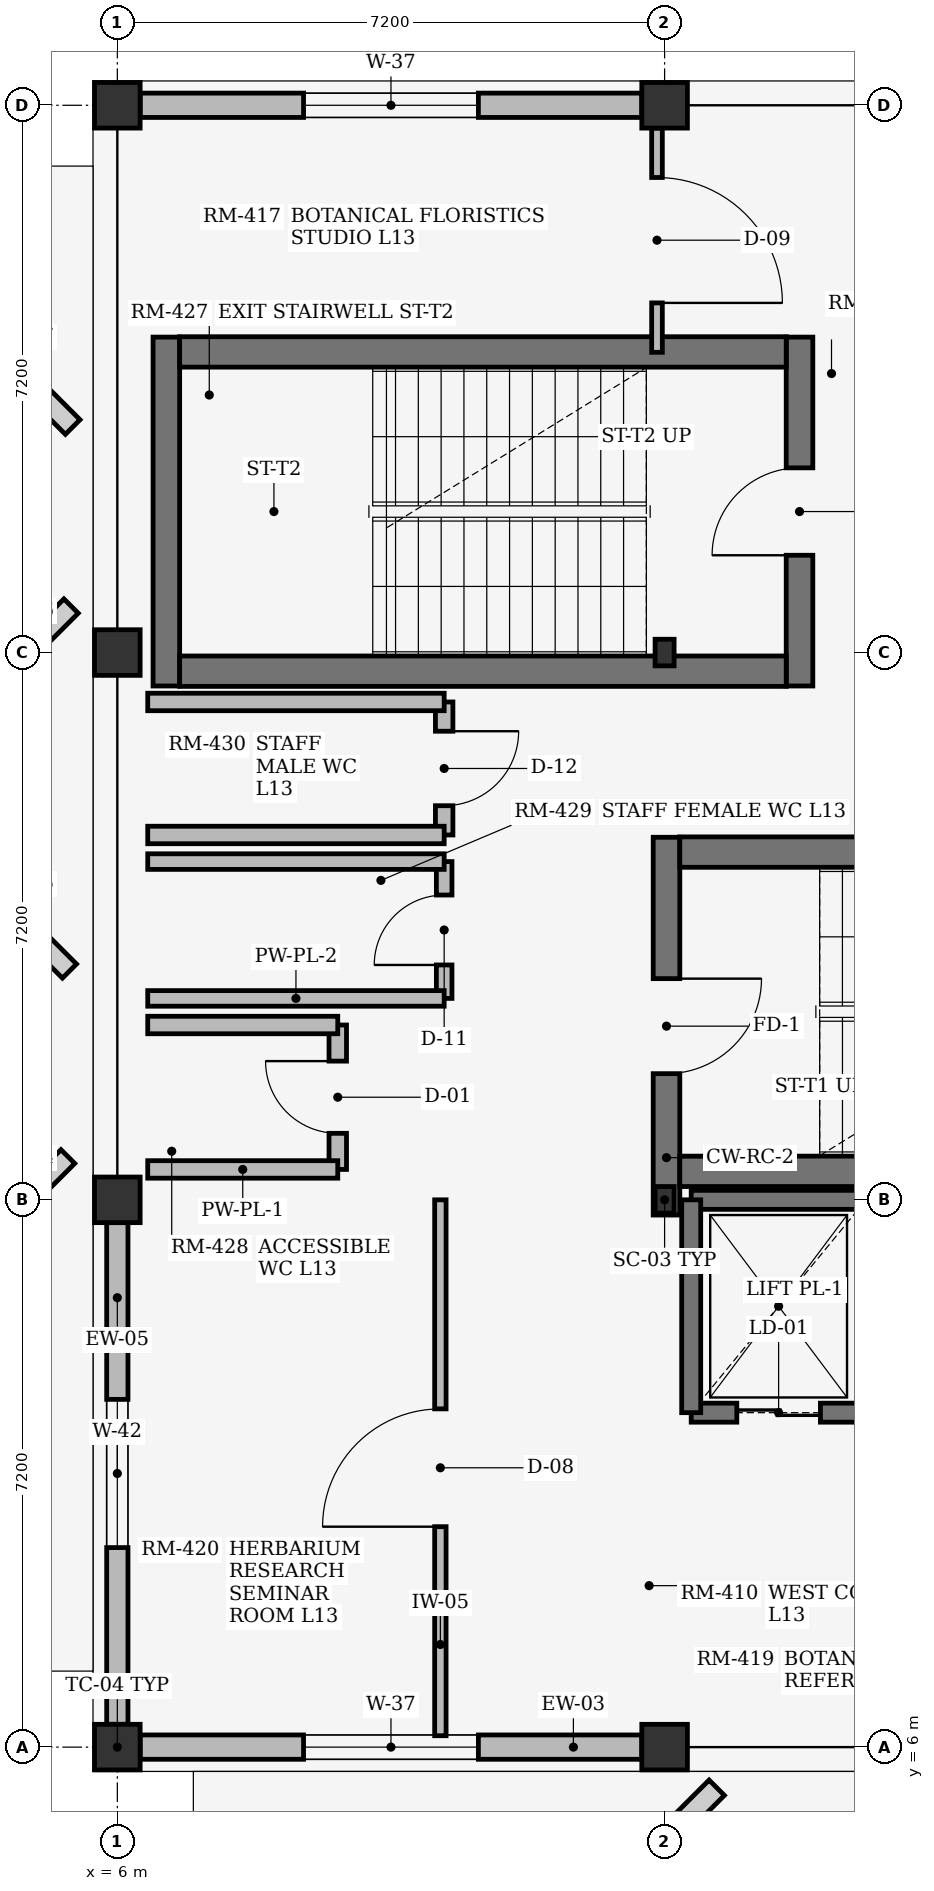
"""IFC4 building model, lengths in metres.
Left out: names, types, materials, properties, quantities, classifications, styles, units other than length and angle.
Written with IfcOpenShell. Run it as: python <this file> out.ifc"""

import sys

from ifc_helpers import new_model, si_unit, direction, frame, frame_2d, origin, origin_2d, place, context, subcontext, project, spatial, rectangle, i_section, extrude, element, fill, save


model = new_model("IFC4")
c1 = context("Model", 3, precision=1e-05, world=origin(), true_north=direction((0.0, 1.0)))
c2 = subcontext(c1, "Body", "Model", "MODEL_VIEW")
j1 = project(units=[si_unit("LENGTHUNIT", "METRE"), si_unit("PLANEANGLEUNIT", "RADIAN")], contexts=[c1])
p1 = place(None, origin())
s1 = spatial("IfcSite", under=j1, at=p1, CompositionType="ELEMENT")
p2 = place(p1, origin())
s2 = spatial("IfcBuilding", under=s1, at=p2, CompositionType="ELEMENT")
p3 = place(p2, frame((0.0, 0.0, 52.2)))
s3 = spatial("IfcBuildingStorey", under=s2, at=p3, CompositionType="ELEMENT", Elevation=52.2)
for number, where, z_axis, x_axis in (
    (1, (6.0, 6.0, 0.0), (0.0, 0.0, 1.0), (1.0, 0.0, 0.0)),
    (2, (6.0, 13.2, 0.0), (0.0, 0.0, 1.0), (1.0, 0.0, 0.0)),
    (3, (6.0, 20.4, 0.0), (0.0, 0.0, 1.0), (1.0, 0.0, 0.0)),
    (4, (6.0, 27.6, 0.0), (0.0, 0.0, 1.0), (1.0, 0.0, 0.0)),
    (5, (13.2, 6.0, 0.0), (0.0, 0.0, 1.0), (1.0, 0.0, 0.0)),
):
    element("IfcColumn", number, at=place(p3, frame(where, z_axis=z_axis, x_axis=x_axis)), inside=s3, PredefinedType="COLUMN", context=c2, shape_type="SweptSolid", body=[
        extrude(rectangle(XDim=0.6, YDim=0.6, at=origin_2d()), origin(), (0.0, 0.0, 1.0), 3.705),
    ])
for number, where, z_axis, x_axis in (
    (6, (13.2, 13.2, 0.0), (0.0, 0.0, 1.0), (1.0, 0.0, 0.0)),
    (7, (13.2, 20.4, 0.0), (0.0, 0.0, 1.0), (1.0, 0.0, 0.0)),
):
    element("IfcColumn", number, at=place(p3, frame(where, z_axis=z_axis, x_axis=x_axis)), inside=s3, PredefinedType="COLUMN", context=c2, shape_type="SweptSolid", body=[
        extrude(i_section(OverallWidth=0.25, OverallDepth=0.35, WebThickness=0.01, FlangeThickness=0.012, at=origin_2d()), origin(), (0.0, 0.0, 1.0), 3.705),
    ])
p4 = place(p3, frame((13.2, 27.6, 0.0), z_axis=(0.0, 0.0, 1.0), x_axis=(1.0, 0.0, 0.0)))
e8 = element("IfcColumn", 8, at=p4, inside=s3, PredefinedType="COLUMN", context=c2, shape_type="SweptSolid", body=[
    extrude(rectangle(XDim=0.6, YDim=0.6, at=origin_2d()), origin(), (0.0, 0.0, 1.0), 3.705),
])
p5 = place(p3, frame((6.3, 6.0, 0.0), z_axis=(0.0, 0.0, 1.0), x_axis=(1.0, 0.0, 0.0)))
e9 = element("IfcWall", 9, at=p5, inside=s3, PredefinedType="STANDARD", context=c2, shape_type="SweptSolid", body=[
    extrude(rectangle(XDim=6.6, YDim=0.32, at=frame_2d((3.3, 0.0))), origin(), (0.0, 0.0, 1.0), 3.285),
])
p6 = place(p5, frame((2.15, 0.0, 0.75)))
e10 = element("IfcOpeningElement", 10, at=p6, cuts=e9, PredefinedType="OPENING", context=c2, shape_type="SweptSolid", body=[
    extrude(rectangle(XDim=2.3, YDim=1.35, at=frame_2d((1.15, 0.675))), frame((0.0, 0.17, 0.0), z_axis=(0.0, -1.0, 0.0), x_axis=(1.0, 0.0, 0.0)), (0.0, 0.0, 1.0), 0.34),
])
p7 = place(p3, frame((6.3, 27.6, 0.0), z_axis=(0.0, 0.0, 1.0), x_axis=(1.0, 0.0, 0.0)))
e11 = element("IfcWall", 11, at=p7, inside=s3, PredefinedType="STANDARD", context=c2, shape_type="SweptSolid", body=[
    extrude(rectangle(XDim=6.6, YDim=0.32, at=frame_2d((3.3, 0.0))), origin(), (0.0, 0.0, 1.0), 3.285),
])
p8 = place(p7, frame((2.15, 0.0, 0.75)))
e12 = element("IfcOpeningElement", 12, at=p8, cuts=e11, PredefinedType="OPENING", context=c2, shape_type="SweptSolid", body=[
    extrude(rectangle(XDim=2.3, YDim=1.35, at=frame_2d((1.15, 0.675))), frame((0.0, 0.17, 0.0), z_axis=(0.0, -1.0, 0.0), x_axis=(1.0, 0.0, 0.0)), (0.0, 0.0, 1.0), 0.34),
])
p9 = place(p3, frame((6.0, 6.3, 0.0), z_axis=(0.0, 0.0, 1.0), x_axis=(0.0, 1.0, 0.0)))
e13 = element("IfcWall", 13, at=p9, inside=s3, PredefinedType="STANDARD", context=c2, shape_type="SweptSolid", body=[
    extrude(rectangle(XDim=6.6, YDim=0.28, at=frame_2d((3.3, 0.0))), origin(), (0.0, 0.0, 1.0), 3.285),
])
p10 = place(p9, frame((2.325, 0.0, 0.75)))
e14 = element("IfcOpeningElement", 14, at=p10, cuts=e13, PredefinedType="OPENING", context=c2, shape_type="SweptSolid", body=[
    extrude(rectangle(XDim=1.95, YDim=1.5, at=frame_2d((0.975, 0.75))), frame((0.0, 0.15, 0.0), z_axis=(0.0, -1.0, 0.0), x_axis=(1.0, 0.0, 0.0)), (0.0, 0.0, 1.0), 0.3),
])
p11 = place(p3, frame((13.225, 13.0, 0.0), z_axis=(0.0, 0.0, 1.0), x_axis=(0.0, 1.0, 0.0)))
e15 = element("IfcWall", 15, at=p11, inside=s3, PredefinedType="SHEAR", context=c2, shape_type="SweptSolid", body=[
    extrude(rectangle(XDim=4.97, YDim=0.35, at=frame_2d((2.485, 0.0))), origin(), (0.0, 0.0, 1.0), 3.705),
])
p12 = place(p11, frame((1.86, 0.0, 0.0)))
e16 = element("IfcOpeningElement", 16, at=p12, cuts=e15, PredefinedType="OPENING", context=c2, shape_type="SweptSolid", body=[
    extrude(rectangle(XDim=1.25, YDim=2.2, at=frame_2d((0.625, 1.1))), frame((0.0, 0.185, 0.0), z_axis=(0.0, -1.0, 0.0), x_axis=(1.0, 0.0, 0.0)), (0.0, 0.0, 1.0), 0.37),
])
for number, where, z_axis, x_axis in (
    (17, (13.4, 13.575, 0.0), (0.0, 0.0, 1.0), (1.0, 0.0, 0.0)),
    (18, (13.4, 17.775, 0.0), (0.0, 0.0, 1.0), (1.0, 0.0, 0.0)),
):
    element("IfcWall", number, at=place(p3, frame(where, z_axis=z_axis, x_axis=x_axis)), inside=s3, PredefinedType="SHEAR", context=c2, shape_type="SweptSolid", body=[
        extrude(rectangle(XDim=7.98, YDim=0.4, at=frame_2d((3.99, 0.0))), origin(), (0.0, 0.0, 1.0), 3.705),
    ])
p13 = place(p3, frame((14.975, 24.55, 0.0), z_axis=(0.0, 0.0, 1.0), x_axis=(0.0, -1.0, 0.0)))
e19 = element("IfcWall", 19, at=p13, inside=s3, PredefinedType="SHEAR", context=c2, shape_type="SweptSolid", body=[
    extrude(rectangle(XDim=4.59, YDim=0.35, at=frame_2d((2.295, 0.0))), origin(), (0.0, 0.0, 1.0), 3.705),
])
p14 = place(p13, frame((1.72, 0.0, 0.0)))
e20 = element("IfcOpeningElement", 20, at=p14, cuts=e19, PredefinedType="OPENING", context=c2, shape_type="SweptSolid", body=[
    extrude(rectangle(XDim=1.15, YDim=2.2, at=frame_2d((0.575, 1.1))), frame((0.0, 0.185, 0.0), z_axis=(0.0, -1.0, 0.0), x_axis=(1.0, 0.0, 0.0)), (0.0, 0.0, 1.0), 0.37),
])
p15 = place(p3, frame((6.645, 24.55, 0.0), z_axis=(0.0, 0.0, 1.0), x_axis=(0.0, -1.0, 0.0)))
e21 = element("IfcWall", 21, at=p15, inside=s3, PredefinedType="SHEAR", context=c2, shape_type="SweptSolid", body=[
    extrude(rectangle(XDim=4.59, YDim=0.35, at=frame_2d((2.295, 0.0))), origin(), (0.0, 0.0, 1.0), 3.705),
])
for number, where, z_axis, x_axis in (
    (22, (14.8, 24.355, 0.0), (0.0, 0.0, 1.0), (-1.0, 0.0, 0.0)),
    (23, (14.8, 20.155, 0.0), (0.0, 0.0, 1.0), (-1.0, 0.0, 0.0)),
):
    element("IfcWall", number, at=place(p3, frame(where, z_axis=z_axis, x_axis=x_axis)), inside=s3, PredefinedType="SHEAR", context=c2, shape_type="SweptSolid", body=[
        extrude(rectangle(XDim=7.98, YDim=0.4, at=frame_2d((3.99, 0.0))), origin(), (0.0, 0.0, 1.0), 3.705),
    ])
p16 = place(p3, frame((13.55, 10.4, 0.0), z_axis=(0.0, 0.0, 1.0), x_axis=(1.0, 0.0, 0.0)))
e24 = element("IfcWall", 24, at=p16, inside=s3, PredefinedType="SHEAR", context=c2, shape_type="SweptSolid", body=[
    extrude(rectangle(XDim=2.3, YDim=0.25, at=frame_2d((1.15, 0.0))), origin(), (0.0, 0.0, 1.0), 3.705),
])
p17 = place(p16, frame((0.6, 0.0, 0.0)))
e25 = element("IfcOpeningElement", 25, at=p17, cuts=e24, PredefinedType="OPENING", context=c2, shape_type="SweptSolid", body=[
    extrude(rectangle(XDim=1.1, YDim=2.2, at=frame_2d((0.55, 1.1))), frame((0.0, 0.135, 0.0), z_axis=(0.0, -1.0, 0.0), x_axis=(1.0, 0.0, 0.0)), (0.0, 0.0, 1.0), 0.27),
])
p18 = place(p3, frame((13.55, 13.2, 0.0), z_axis=(0.0, 0.0, 1.0), x_axis=(1.0, 0.0, 0.0)))
e26 = element("IfcWall", 26, at=p18, inside=s3, PredefinedType="SHEAR", context=c2, shape_type="SweptSolid", body=[
    extrude(rectangle(XDim=2.3, YDim=0.25, at=frame_2d((1.15, 0.0))), origin(), (0.0, 0.0, 1.0), 3.705),
])
p19 = place(p3, frame((13.55, 10.4, 0.0), z_axis=(0.0, 0.0, 1.0), x_axis=(0.0, 1.0, 0.0)))
e27 = element("IfcWall", 27, at=p19, inside=s3, PredefinedType="SHEAR", context=c2, shape_type="SweptSolid", body=[
    extrude(rectangle(XDim=2.8, YDim=0.25, at=frame_2d((1.4, 0.0))), origin(), (0.0, 0.0, 1.0), 3.705),
])
p20 = place(p3, frame((8.9, 13.6, 0.0), z_axis=(0.0, 0.0, 1.0), x_axis=(0.0, 1.0, 0.0)))
e28 = element("IfcWall", 28, at=p20, inside=s3, PredefinedType="PLUMBINGWALL", context=c2, shape_type="SweptSolid", body=[
    extrude(rectangle(XDim=1.9, YDim=0.23, at=frame_2d((0.95, 0.0))), origin(), (0.0, 0.0, 1.0), 3.685),
])
p21 = place(p20, frame((0.475, 0.0, 0.0)))
e29 = element("IfcOpeningElement", 29, at=p21, cuts=e28, PredefinedType="OPENING", context=c2, shape_type="SweptSolid", body=[
    extrude(rectangle(XDim=0.95, YDim=2.15, at=frame_2d((0.475, 1.075))), frame((0.0, 0.125, 0.0), z_axis=(0.0, -1.0, 0.0), x_axis=(1.0, 0.0, 0.0)), (0.0, 0.0, 1.0), 0.25),
])
for number, where, z_axis, x_axis in (
    (30, (6.4, 13.6, 0.0), (0.0, 0.0, 1.0), (1.0, 0.0, 0.0)),
    (31, (6.4, 15.5, 0.0), (0.0, 0.0, 1.0), (1.0, 0.0, 0.0)),
):
    element("IfcWall", number, at=place(p3, frame(where, z_axis=z_axis, x_axis=x_axis)), inside=s3, PredefinedType="PLUMBINGWALL", context=c2, shape_type="SweptSolid", body=[
        extrude(rectangle(XDim=2.5, YDim=0.23, at=frame_2d((1.25, 0.0))), origin(), (0.0, 0.0, 1.0), 3.685),
    ])
p22 = place(p3, frame((10.3, 15.85, 0.0), z_axis=(0.0, 0.0, 1.0), x_axis=(0.0, 1.0, 0.0)))
e32 = element("IfcWall", 32, at=p22, inside=s3, PredefinedType="PLUMBINGWALL", context=c2, shape_type="SweptSolid", body=[
    extrude(rectangle(XDim=1.8, YDim=0.205, at=frame_2d((0.9, 0.0))), origin(), (0.0, 0.0, 1.0), 3.685),
])
p23 = place(p22, frame((0.44, 0.0, 0.0)))
e33 = element("IfcOpeningElement", 33, at=p23, cuts=e32, PredefinedType="OPENING", context=c2, shape_type="SweptSolid", body=[
    extrude(rectangle(XDim=0.92, YDim=2.1, at=frame_2d((0.46, 1.05))), frame((0.0, 0.113, 0.0), z_axis=(0.0, -1.0, 0.0), x_axis=(1.0, 0.0, 0.0)), (0.0, 0.0, 1.0), 0.225),
])
for number, where, z_axis, x_axis in (
    (34, (6.4, 15.85, 0.0), (0.0, 0.0, 1.0), (1.0, 0.0, 0.0)),
    (35, (6.4, 17.65, 0.0), (0.0, 0.0, 1.0), (1.0, 0.0, 0.0)),
):
    element("IfcWall", number, at=place(p3, frame(where, z_axis=z_axis, x_axis=x_axis)), inside=s3, PredefinedType="PLUMBINGWALL", context=c2, shape_type="SweptSolid", body=[
        extrude(rectangle(XDim=3.9, YDim=0.205, at=frame_2d((1.95, 0.0))), origin(), (0.0, 0.0, 1.0), 3.685),
    ])
p24 = place(p3, frame((10.3, 18.0, 0.0), z_axis=(0.0, 0.0, 1.0), x_axis=(0.0, 1.0, 0.0)))
e36 = element("IfcWall", 36, at=p24, inside=s3, PredefinedType="PLUMBINGWALL", context=c2, shape_type="SweptSolid", body=[
    extrude(rectangle(XDim=1.75, YDim=0.23, at=frame_2d((0.875, 0.0))), origin(), (0.0, 0.0, 1.0), 3.685),
])
p25 = place(p24, frame((0.385, 0.0, 0.0)))
e37 = element("IfcOpeningElement", 37, at=p25, cuts=e36, PredefinedType="OPENING", context=c2, shape_type="SweptSolid", body=[
    extrude(rectangle(XDim=0.98, YDim=2.1, at=frame_2d((0.49, 1.05))), frame((0.0, 0.125, 0.0), z_axis=(0.0, -1.0, 0.0), x_axis=(1.0, 0.0, 0.0)), (0.0, 0.0, 1.0), 0.25),
])
for number, where, z_axis, x_axis in (
    (38, (6.4, 18.0, 0.0), (0.0, 0.0, 1.0), (1.0, 0.0, 0.0)),
    (39, (6.4, 19.75, 0.0), (0.0, 0.0, 1.0), (1.0, 0.0, 0.0)),
):
    element("IfcWall", number, at=place(p3, frame(where, z_axis=z_axis, x_axis=x_axis)), inside=s3, PredefinedType="PLUMBINGWALL", context=c2, shape_type="SweptSolid", body=[
        extrude(rectangle(XDim=3.9, YDim=0.23, at=frame_2d((1.95, 0.0))), origin(), (0.0, 0.0, 1.0), 3.685),
    ])
p26 = place(p3, frame((10.25, 6.15, 0.0), z_axis=(0.0, 0.0, 1.0), x_axis=(0.0, 1.0, 0.0)))
e40 = element("IfcWall", 40, at=p26, inside=s3, PredefinedType="PARTITIONING", context=c2, shape_type="SweptSolid", body=[
    extrude(rectangle(XDim=7.05, YDim=0.15, at=frame_2d((3.525, 0.0))), origin(), (0.0, 0.0, 1.0), 3.685),
])
p27 = place(p26, frame((2.75, 0.0, 0.0)))
e41 = element("IfcOpeningElement", 41, at=p27, cuts=e40, PredefinedType="OPENING", context=c2, shape_type="SweptSolid", body=[
    extrude(rectangle(XDim=1.55, YDim=2.25, at=frame_2d((0.775, 1.125))), frame((0.0, 0.085, 0.0), z_axis=(0.0, -1.0, 0.0), x_axis=(1.0, 0.0, 0.0)), (0.0, 0.0, 1.0), 0.17),
])
p28 = place(p3, frame((13.1, 24.35, 0.0), z_axis=(0.0, 0.0, 1.0), x_axis=(0.0, 1.0, 0.0)))
e42 = element("IfcWall", 42, at=p28, inside=s3, PredefinedType="PARTITIONING", context=c2, shape_type="SweptSolid", body=[
    extrude(rectangle(XDim=2.95, YDim=0.14, at=frame_2d((1.475, 0.0))), origin(), (0.0, 0.0, 1.0), 3.295),
])
p29 = place(p28, frame((0.65, 0.0, 0.0)))
e43 = element("IfcOpeningElement", 43, at=p29, cuts=e42, PredefinedType="OPENING", context=c2, shape_type="SweptSolid", body=[
    extrude(rectangle(XDim=1.65, YDim=2.25, at=frame_2d((0.825, 1.125))), frame((0.0, 0.08, 0.0), z_axis=(0.0, -1.0, 0.0), x_axis=(1.0, 0.0, 0.0)), (0.0, 0.0, 1.0), 0.16),
])
p30 = place(p6, origin())
e44 = element("IfcWindow", 44, at=p30, inside=s3, PartitioningType="SINGLE_PANEL", PredefinedType="WINDOW", context=c2, shape_type="SweptSolid", body=[
    extrude(rectangle(XDim=2.3, YDim=1.35, at=frame_2d((1.15, 0.675))), frame((0.0, 0.03, 0.0), z_axis=(0.0, -1.0, 0.0), x_axis=(1.0, 0.0, 0.0)), (0.0, 0.0, 1.0), 0.06),
])
fill(e10, e44)
p31 = place(p8, origin())
e45 = element("IfcWindow", 45, at=p31, inside=s3, PartitioningType="SINGLE_PANEL", PredefinedType="WINDOW", context=c2, shape_type="SweptSolid", body=[
    extrude(rectangle(XDim=2.3, YDim=1.35, at=frame_2d((1.15, 0.675))), frame((0.0, 0.03, 0.0), z_axis=(0.0, -1.0, 0.0), x_axis=(1.0, 0.0, 0.0)), (0.0, 0.0, 1.0), 0.06),
])
fill(e12, e45)
p32 = place(p10, origin())
e46 = element("IfcWindow", 46, at=p32, inside=s3, PartitioningType="SINGLE_PANEL", PredefinedType="WINDOW", context=c2, shape_type="SweptSolid", body=[
    extrude(rectangle(XDim=1.95, YDim=1.5, at=frame_2d((0.975, 0.75))), frame((0.0, 0.03, 0.0), z_axis=(0.0, -1.0, 0.0), x_axis=(1.0, 0.0, 0.0)), (0.0, 0.0, 1.0), 0.06),
])
fill(e14, e46)
p33 = place(p12, origin())
e47 = element("IfcDoor", 47, at=p33, inside=s3, OperationType="SINGLE_SWING_RIGHT", PredefinedType="DOOR", context=c2, shape_type="SweptSolid", body=[
    extrude(rectangle(XDim=1.25, YDim=2.2, at=frame_2d((0.625, 1.1))), frame((0.0, 0.025, 0.0), z_axis=(0.0, -1.0, 0.0), x_axis=(1.0, 0.0, 0.0)), (0.0, 0.0, 1.0), 0.05),
])
fill(e16, e47)
p34 = place(p14, origin())
e48 = element("IfcDoor", 48, at=p34, inside=s3, OperationType="SINGLE_SWING_RIGHT", PredefinedType="DOOR", context=c2, shape_type="SweptSolid", body=[
    extrude(rectangle(XDim=1.15, YDim=2.2, at=frame_2d((0.575, 1.1))), frame((0.0, 0.025, 0.0), z_axis=(0.0, -1.0, 0.0), x_axis=(1.0, 0.0, 0.0)), (0.0, 0.0, 1.0), 0.05),
])
fill(e20, e48)
p35 = place(p17, origin())
e49 = element("IfcDoor", 49, at=p35, inside=s3, OperationType="DOUBLE_DOOR_SLIDING", PredefinedType="DOOR", context=c2, shape_type="SweptSolid", body=[
    extrude(rectangle(XDim=1.1, YDim=2.2, at=frame_2d((0.55, 1.1))), frame((0.0, 0.025, 0.0), z_axis=(0.0, -1.0, 0.0), x_axis=(1.0, 0.0, 0.0)), (0.0, 0.0, 1.0), 0.05),
])
fill(e25, e49)
p36 = place(p21, frame((0.95, 0.0, 0.0), z_axis=(0.0, 0.0, 1.0), x_axis=(-1.0, 0.0, 0.0)))
e50 = element("IfcDoor", 50, at=p36, inside=s3, OperationType="SINGLE_SWING_RIGHT", PredefinedType="DOOR", context=c2, shape_type="SweptSolid", body=[
    extrude(rectangle(XDim=0.95, YDim=2.15, at=frame_2d((0.475, 1.075))), frame((0.0, 0.025, 0.0), z_axis=(0.0, -1.0, 0.0), x_axis=(1.0, 0.0, 0.0)), (0.0, 0.0, 1.0), 0.05),
])
fill(e29, e50)
p37 = place(p23, origin())
e51 = element("IfcDoor", 51, at=p37, inside=s3, OperationType="SINGLE_SWING_LEFT", PredefinedType="DOOR", context=c2, shape_type="SweptSolid", body=[
    extrude(rectangle(XDim=0.92, YDim=2.1, at=frame_2d((0.46, 1.05))), frame((0.0, 0.025, 0.0), z_axis=(0.0, -1.0, 0.0), x_axis=(1.0, 0.0, 0.0)), (0.0, 0.0, 1.0), 0.05),
])
fill(e33, e51)
p38 = place(p25, origin())
e52 = element("IfcDoor", 52, at=p38, inside=s3, OperationType="SINGLE_SWING_RIGHT", PredefinedType="DOOR", context=c2, shape_type="SweptSolid", body=[
    extrude(rectangle(XDim=0.98, YDim=2.1, at=frame_2d((0.49, 1.05))), frame((0.0, 0.025, 0.0), z_axis=(0.0, -1.0, 0.0), x_axis=(1.0, 0.0, 0.0)), (0.0, 0.0, 1.0), 0.05),
])
fill(e37, e52)
p39 = place(p27, origin())
e53 = element("IfcDoor", 53, at=p39, inside=s3, OperationType="DOUBLE_DOOR_SINGLE_SWING", PredefinedType="DOOR", context=c2, shape_type="SweptSolid", body=[
    extrude(rectangle(XDim=1.55, YDim=2.25, at=frame_2d((0.775, 1.125))), frame((0.0, 0.025, 0.0), z_axis=(0.0, -1.0, 0.0), x_axis=(1.0, 0.0, 0.0)), (0.0, 0.0, 1.0), 0.05),
])
fill(e41, e53)
p40 = place(p29, frame((1.65, 0.0, 0.0), z_axis=(0.0, 0.0, 1.0), x_axis=(-1.0, 0.0, 0.0)))
e54 = element("IfcDoor", 54, at=p40, inside=s3, OperationType="DOUBLE_DOOR_SINGLE_SWING", PredefinedType="DOOR", context=c2, shape_type="SweptSolid", body=[
    extrude(rectangle(XDim=1.65, YDim=2.25, at=frame_2d((0.825, 1.125))), frame((0.0, 0.025, 0.0), z_axis=(0.0, -1.0, 0.0), x_axis=(1.0, 0.0, 0.0)), (0.0, 0.0, 1.0), 0.05),
])
fill(e43, e54)
save(model, sys.argv[1])
